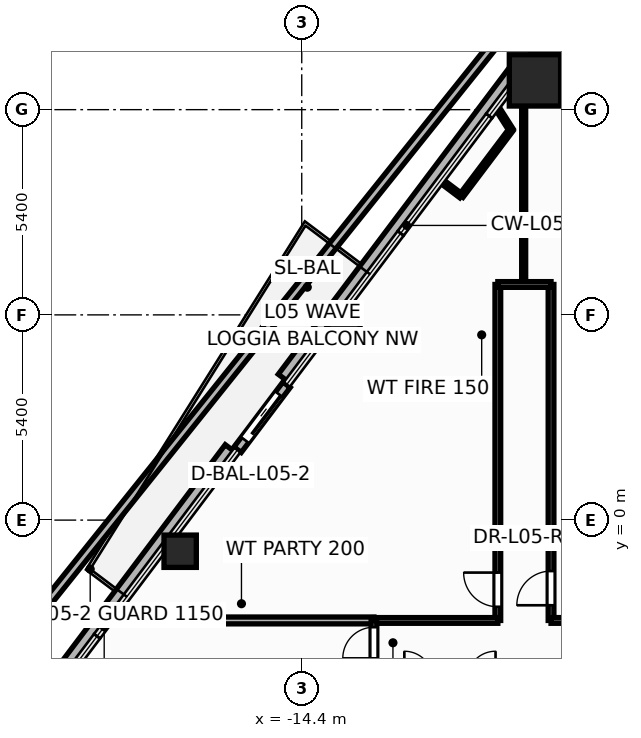
"""IFC4 building model, lengths in metres.
Left out: names, types, materials, properties, quantities, classifications, styles, units other than length and angle.
Written with IfcOpenShell. Run it as: python <this file> out.ifc"""

import sys

from ifc_helpers import new_model, si_unit, direction, frame, frame_2d, origin, origin_2d, place, context, subcontext, project, spatial, rectangle, hollow_rectangle, hollow_circle, extrude, element, fill, save


model = new_model("IFC4")
c1 = context("Model", 3, precision=1e-05, world=origin(), true_north=direction((0.0, 1.0)))
c2 = subcontext(c1, "Body", "Model", "MODEL_VIEW")
j1 = project(units=[si_unit("LENGTHUNIT", "METRE"), si_unit("PLANEANGLEUNIT", "RADIAN")], contexts=[c1])
p1 = place(None, origin())
s1 = spatial("IfcSite", under=j1, at=p1, CompositionType="ELEMENT")
p2 = place(p1, origin())
s2 = spatial("IfcBuilding", under=s1, at=p2, CompositionType="ELEMENT")
p3 = place(p2, frame((0.0, 0.0, 24.3)))
s3 = spatial("IfcBuildingStorey", under=s2, at=p3, CompositionType="ELEMENT", Elevation=24.3)
p4 = place(p3, frame((-8.263, 11.57, 0.0), z_axis=(0.0, 0.0, 1.0), x_axis=(1.0, 0.0, 0.0)))
e1 = element("IfcColumn", 1, at=p4, inside=s3, PredefinedType="COLUMN", context=c2, shape_type="SweptSolid", body=[
    extrude(hollow_rectangle(XDim=1.35, YDim=1.35, WallThickness=0.065, at=origin_2d()), origin(), (0.0, 0.0, 1.0), 3.6),
])
for number, where, z_axis, x_axis in (
    (2, (-13.29, 4.899, 0.0), (0.0, 0.0, 1.0), (1.0, 0.0, 0.0)),
    (3, (-17.599, -0.819, 0.0), (0.0, 0.0, 1.0), (1.0, 0.0, 0.0)),
):
    element("IfcColumn", number, at=place(p3, frame(where, z_axis=z_axis, x_axis=x_axis)), inside=s3, PredefinedType="COLUMN", context=c2, shape_type="SweptSolid", body=[
        extrude(hollow_circle(Radius=0.425, WallThickness=0.038, at=origin_2d()), origin(), (0.0, 0.0, 1.0), 3.6),
    ])
p5 = place(p3, frame((-7.897, 14.316, -0.02), z_axis=(0.0, 0.0, 1.0), x_axis=(-0.625118708534, -0.780529692094, 0.0)))
e4 = element("IfcWall", 4, at=p5, inside=s3, PredefinedType="PARAPET", context=c2, shape_type="SweptSolid", body=[
    extrude(rectangle(XDim=32.25, YDim=0.22, at=frame_2d((16.125, 0.0))), origin(), (0.0, 0.0, 1.0), 1.17),
])
p6 = place(p3, frame((8.383, 12.13, -0.2), z_axis=(0.0, 0.0, 1.0), x_axis=(-1.0, 0.0, 0.0)))
e5 = element("IfcWall", 5, at=p6, inside=s3, PredefinedType="PARAPET", context=c2, shape_type="SweptSolid", body=[
    extrude(rectangle(XDim=16.765, YDim=0.36, at=frame_2d((8.383, 0.0))), origin(), (0.0, 0.0, 1.0), 0.38),
])
p7 = place(p3, frame((-8.663, 11.971, -0.2), z_axis=(0.0, 0.0, 1.0), x_axis=(-0.601811534932, -0.798638138597, 0.0)))
e6 = element("IfcWall", 6, at=p7, inside=s3, PredefinedType="PARAPET", context=c2, shape_type="SweptSolid", body=[
    extrude(rectangle(XDim=10.32, YDim=0.36, at=frame_2d((5.16, 0.0))), origin(), (0.0, 0.0, 1.0), 0.38),
])
p8 = place(p3, frame((-16.269, 1.876, -0.2), z_axis=(0.0, 0.0, 1.0), x_axis=(-0.601817630469, -0.798633545286, 0.0)))
e7 = element("IfcWall", 7, at=p8, inside=s3, PredefinedType="PARAPET", context=c2, shape_type="SweptSolid", body=[
    extrude(rectangle(XDim=11.488, YDim=0.36, at=frame_2d((5.744, 0.0))), origin(), (0.0, 0.0, 1.0), 0.38),
])
p9 = place(p3, frame((-14.8, 3.561, -0.015), z_axis=(0.0, 0.0, 1.0), x_axis=(-0.601823875366, -0.798628839349, 0.0)))
e8 = element("IfcWall", 8, at=p9, inside=s3, PredefinedType="STANDARD", context=c2, shape_type="SweptSolid", body=[
    extrude(rectangle(XDim=2.14, YDim=0.24, at=frame_2d((1.07, 0.0))), origin(), (0.0, 0.0, 1.0), 2.729),
])
p10 = place(p9, frame((0.32, 0.0, 0.015)))
e9 = element("IfcOpeningElement", 9, at=p10, cuts=e8, PredefinedType="OPENING", context=c2, shape_type="SweptSolid", body=[
    extrude(rectangle(XDim=1.506, YDim=2.204, at=frame_2d((0.75, 1.102))), frame((0.0, 0.13, 0.0), z_axis=(0.0, -1.0, 0.0), x_axis=(1.0, 0.0, 0.0)), (0.0, 0.0, 1.0), 0.26),
])
p11 = place(p3, frame((-9.24, -2.64, 0.0), z_axis=(0.0, 0.0, 1.0), x_axis=(0.0, 1.0, 0.0)))
e10 = element("IfcWall", 10, at=p11, inside=s3, PredefinedType="PARTITIONING", context=c2, shape_type="SweptSolid", body=[
    extrude(rectangle(XDim=8.84, YDim=0.15, at=frame_2d((4.42, 0.0))), origin(), (0.0, 0.0, 1.0), 2.509),
])
p12 = place(p11, frame((0.359, 0.0, 0.0)))
e11 = element("IfcOpeningElement", 11, at=p12, cuts=e10, PredefinedType="OPENING", context=c2, shape_type="SweptSolid", body=[
    extrude(rectangle(XDim=0.906, YDim=2.104, at=frame_2d((0.45, 1.052))), frame((0.0, 0.085, 0.0), z_axis=(0.0, -1.0, 0.0), x_axis=(1.0, 0.0, 0.0)), (0.0, 0.0, 1.0), 0.17),
])
p13 = place(p3, frame((-7.84, -2.64, 0.0), z_axis=(0.0, 0.0, 1.0), x_axis=(0.0, 1.0, 0.0)))
e12 = element("IfcWall", 12, at=p13, inside=s3, PredefinedType="PARTITIONING", context=c2, shape_type="SweptSolid", body=[
    extrude(rectangle(XDim=8.84, YDim=0.15, at=frame_2d((4.42, 0.0))), origin(), (0.0, 0.0, 1.0), 2.509),
])
p14 = place(p13, frame((0.399, 0.0, 0.0)))
e13 = element("IfcOpeningElement", 13, at=p14, cuts=e12, PredefinedType="OPENING", context=c2, shape_type="SweptSolid", body=[
    extrude(rectangle(XDim=0.906, YDim=2.104, at=frame_2d((0.45, 1.052))), frame((0.0, 0.085, 0.0), z_axis=(0.0, -1.0, 0.0), x_axis=(1.0, 0.0, 0.0)), (0.0, 0.0, 1.0), 0.17),
])
p15 = place(p3, frame((-19.472, -2.64, 0.0), z_axis=(0.0, 0.0, 1.0), x_axis=(1.0, 0.0, 0.0)))
e14 = element("IfcWall", 14, at=p15, inside=s3, PredefinedType="PARTITIONING", context=c2, shape_type="SweptSolid", body=[
    extrude(rectangle(XDim=6.972, YDim=0.18, at=frame_2d((3.486, 0.0))), origin(), (0.0, 0.0, 1.0), 2.713),
])
p16 = place(p3, frame((-7.84, -2.64, 0.0), z_axis=(0.0, 0.0, 1.0), x_axis=(1.0, 0.0, 0.0)))
e15 = element("IfcWall", 15, at=p16, inside=s3, PredefinedType="PARTITIONING", context=c2, shape_type="SweptSolid", body=[
    extrude(rectangle(XDim=8.578, YDim=0.15, at=frame_2d((4.289, 0.0))), origin(), (0.0, 0.0, 1.0), 2.325),
])
p17 = place(p3, frame((-8.56, 6.2, 0.0), z_axis=(0.0, 0.0, 1.0), x_axis=(0.0, 1.0, 0.0)))
e16 = element("IfcWall", 16, at=p17, inside=s3, PredefinedType="PARTITIONING", context=c2, shape_type="SweptSolid", body=[
    extrude(rectangle(XDim=5.641, YDim=0.105, at=frame_2d((2.821, 0.0))), origin(), (0.0, 0.0, 1.0), 2.509),
])
p18 = place(p3, frame((-12.5, -2.64, 0.0), z_axis=(0.0, 0.0, 1.0), x_axis=(1.0, 0.0, 0.0)))
e17 = element("IfcWall", 17, at=p18, inside=s3, PredefinedType="PARTITIONING", context=c2, shape_type="SweptSolid", body=[
    extrude(rectangle(XDim=3.26, YDim=0.15, at=frame_2d((1.63, 0.0))), origin(), (0.0, 0.0, 1.0), 3.35),
])
p19 = place(p3, frame((-8.893, 10.27, 0.0), z_axis=(0.0, 0.0, 1.0), x_axis=(-0.601844028436, -0.798613652172, 0.0)))
e18 = element("IfcWall", 18, at=p19, inside=s3, PredefinedType="PARTITIONING", context=c2, shape_type="SweptSolid", body=[
    extrude(rectangle(XDim=2.18, YDim=0.12, at=frame_2d((1.09, 0.0))), origin(), (0.0, 0.0, 1.0), 3.35),
])
p20 = place(p3, frame((-12.5, -4.24, 0.0), z_axis=(0.0, 0.0, 1.0), x_axis=(0.0, 1.0, 0.0)))
e19 = element("IfcWall", 19, at=p20, inside=s3, PredefinedType="PARTITIONING", context=c2, shape_type="SweptSolid", body=[
    extrude(rectangle(XDim=1.6, YDim=0.15, at=frame_2d((0.8, 0.0))), origin(), (0.0, 0.0, 1.0), 2.325),
])
p21 = place(p20, frame((0.602, 0.0, 0.0)))
e20 = element("IfcOpeningElement", 20, at=p21, cuts=e19, PredefinedType="OPENING", context=c2, shape_type="SweptSolid", body=[
    extrude(rectangle(XDim=0.826, YDim=2.104, at=frame_2d((0.41, 1.052))), frame((0.0, 0.085, 0.0), z_axis=(0.0, -1.0, 0.0), x_axis=(1.0, 0.0, 0.0)), (0.0, 0.0, 1.0), 0.17),
])
p22 = place(p3, frame((-9.24, 6.2, 0.0), z_axis=(0.0, 0.0, 1.0), x_axis=(1.0, 0.0, 0.0)))
e21 = element("IfcWall", 21, at=p22, inside=s3, PredefinedType="PARTITIONING", context=c2, shape_type="SweptSolid", body=[
    extrude(rectangle(XDim=1.4, YDim=0.15, at=frame_2d((0.7, 0.0))), origin(), (0.0, 0.0, 1.0), 3.35),
])
p23 = place(p3, frame((-9.277, 10.873, 0.0), z_axis=(0.0, 0.0, 1.0), x_axis=(0.537493641355, -0.84326780177, 0.0)))
e22 = element("IfcWall", 22, at=p23, inside=s3, PredefinedType="PARTITIONING", context=c2, shape_type="SweptSolid", body=[
    extrude(rectangle(XDim=0.715, YDim=0.12, at=frame_2d((0.358, 0.0))), origin(), (0.0, 0.0, 1.0), 2.713),
])
p24 = place(p3, frame((-10.205, 8.529, 0.0), z_axis=(0.0, 0.0, 1.0), x_axis=(-0.798641978857, 0.601806438655, 0.0)))
e23 = element("IfcWall", 23, at=p24, inside=s3, PredefinedType="PARTITIONING", context=c2, shape_type="SweptSolid", body=[
    extrude(rectangle(XDim=0.67, YDim=0.12, at=frame_2d((0.335, 0.0))), origin(), (0.0, 0.0, 1.0), 2.713),
])
p25 = place(p10, origin())
e24 = element("IfcDoor", 24, at=p25, inside=s3, OperationType="SLIDING_TO_RIGHT", PredefinedType="DOOR", context=c2, shape_type="SweptSolid", body=[
    extrude(rectangle(XDim=1.5, YDim=2.2, at=frame_2d((0.75, 1.1))), frame((0.0, 0.025, 0.0), z_axis=(0.0, -1.0, 0.0), x_axis=(1.0, 0.0, 0.0)), (0.0, 0.0, 1.0), 0.05),
])
fill(e9, e24)
p26 = place(p21, origin())
e25 = element("IfcDoor", 25, at=p26, inside=s3, OperationType="SINGLE_SWING_LEFT", PredefinedType="DOOR", context=c2, shape_type="SweptSolid", body=[
    extrude(rectangle(XDim=0.82, YDim=2.1, at=frame_2d((0.41, 1.05))), frame((0.0, 0.025, 0.0), z_axis=(0.0, -1.0, 0.0), x_axis=(1.0, 0.0, 0.0)), (0.0, 0.0, 1.0), 0.05),
])
fill(e20, e25)
p27 = place(p12, origin())
e26 = element("IfcDoor", 26, at=p27, inside=s3, OperationType="SINGLE_SWING_RIGHT", PredefinedType="DOOR", context=c2, shape_type="SweptSolid", body=[
    extrude(rectangle(XDim=0.9, YDim=2.1, at=frame_2d((0.45, 1.05))), frame((0.0, 0.025, 0.0), z_axis=(0.0, -1.0, 0.0), x_axis=(1.0, 0.0, 0.0)), (0.0, 0.0, 1.0), 0.05),
])
fill(e11, e26)
p28 = place(p14, origin())
e27 = element("IfcDoor", 27, at=p28, inside=s3, OperationType="SINGLE_SWING_LEFT", PredefinedType="DOOR", context=c2, shape_type="SweptSolid", body=[
    extrude(rectangle(XDim=0.9, YDim=2.1, at=frame_2d((0.45, 1.05))), frame((0.0, 0.025, 0.0), z_axis=(0.0, -1.0, 0.0), x_axis=(1.0, 0.0, 0.0)), (0.0, 0.0, 1.0), 0.05),
])
fill(e13, e27)
save(model, sys.argv[1])
